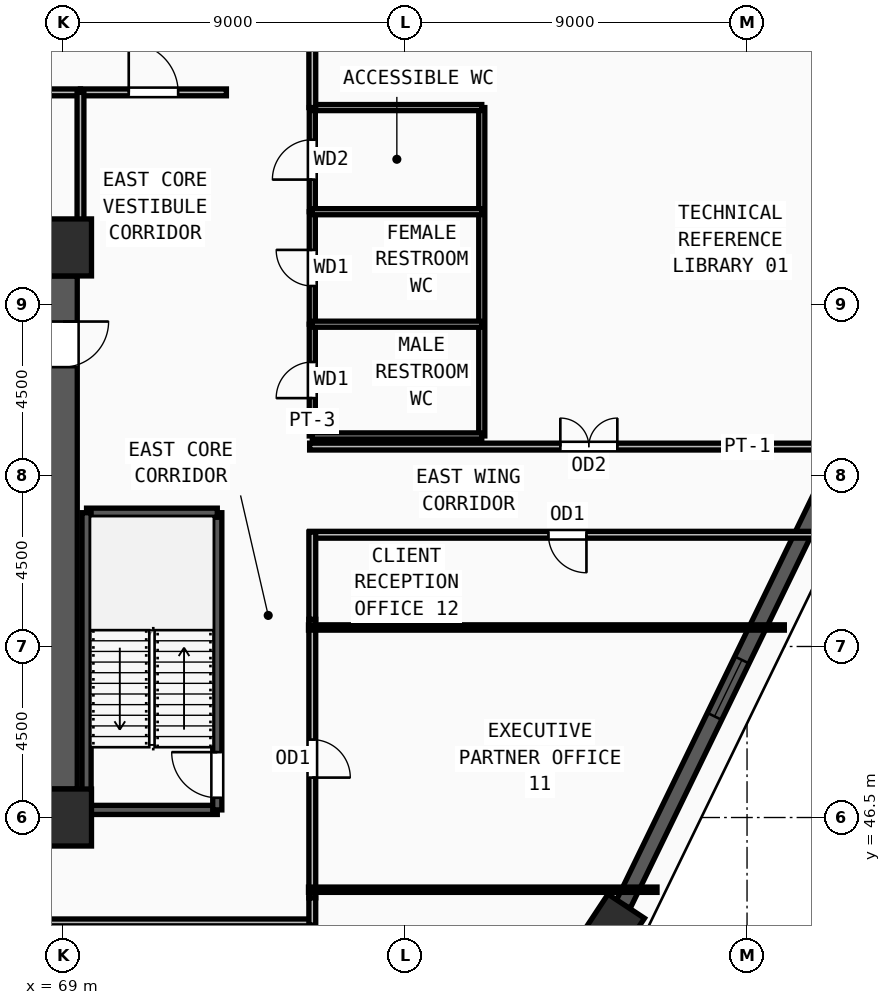
"""IFC4 building model, lengths in metres.
Left out: names, types, materials, properties, quantities, classifications, styles, units other than length and angle.
Written with IfcOpenShell. Run it as: python <this file> out.ifc"""

import sys

from ifc_helpers import new_model, si_unit, direction, frame, frame_2d, origin, origin_2d, place, context, subcontext, project, spatial, rectangle, extrude, source, transform, mapped, element, fill, save


model = new_model("IFC4")
c1 = context("Model", 3, precision=1e-05, world=origin(), true_north=direction((0.0, 1.0)))
c2 = subcontext(c1, "Body", "Model", "MODEL_VIEW")
j1 = project(units=[si_unit("LENGTHUNIT", "METRE"), si_unit("PLANEANGLEUNIT", "RADIAN")], contexts=[c1])
p1 = place(None, origin())
s1 = spatial("IfcSite", under=j1, at=p1, CompositionType="ELEMENT")
p2 = place(p1, origin())
s2 = spatial("IfcBuilding", under=s1, at=p2, CompositionType="ELEMENT")
p3 = place(p2, frame((0.0, 0.0, 155.25)))
s3 = spatial("IfcBuildingStorey", under=s2, at=p3, CompositionType="ELEMENT", Elevation=155.25)
m1 = source(origin(), c2, "Body", "SweptSolid", [
    extrude(rectangle(XDim=1.5, YDim=1.5, at=origin_2d()), origin(), (0.0, 0.0, 1.0), 3.75),
])
for number, where, z_axis, x_axis in (
    (1, (69.0, 46.5, 0.0), (0.0, 0.0, 1.0), (1.0, 0.0, 0.0)),
    (2, (69.0, 61.5, 0.0), (0.0, 0.0, 1.0), (1.0, 0.0, 0.0)),
):
    element("IfcColumn", number, at=place(p3, frame(where, z_axis=z_axis, x_axis=x_axis)), inside=s3, PredefinedType="COLUMN", context=c2, shape_type="MappedRepresentation", body=[
        mapped(m1, transform((0.0, 0.0, 0.0), x_axis=(1.0, 0.0, 0.0), y_axis=(0.0, 1.0, 0.0), z_axis=(0.0, 0.0, 1.0), scale=1.0)),
    ])
m2 = source(origin(), c2, "Body", "SweptSolid", [
    extrude(rectangle(XDim=1.4, YDim=1.15, at=origin_2d()), origin(), (0.0, 0.0, 1.0), 3.75),
])
p4 = place(p3, frame((83.436, 43.582, 0.0), z_axis=(0.0, 0.0, 1.0), x_axis=(0.550917789925, 0.834559517796, 0.0)))
e3 = element("IfcColumn", 3, at=p4, inside=s3, PredefinedType="COLUMN", context=c2, shape_type="MappedRepresentation", body=[
    mapped(m2, transform((0.0, 0.0, 0.0), x_axis=(1.0, 0.0, 0.0), y_axis=(0.0, 1.0, 0.0), z_axis=(0.0, 0.0, 1.0), scale=1.0)),
])
p5 = place(p3, frame((83.737, 44.203, 0.0), z_axis=(0.0, 0.0, 1.0), x_axis=(0.436800646479, 0.899558333426, 0.0)))
e4 = element("IfcWall", 4, at=p5, inside=s3, PredefinedType="SOLIDWALL", context=c2, shape_type="SweptSolid", body=[
    extrude(rectangle(XDim=25.348, YDim=0.42, at=frame_2d((12.674, 0.0))), origin(), (0.0, 0.0, 1.0), 3.57),
])
m3 = source(origin(), c2, "Body", "SweptSolid", [
    extrude(rectangle(XDim=1.65, YDim=1.95, at=frame_2d((0.825, 0.975))), frame((0.0, 0.22, 0.0), z_axis=(0.0, -1.0, 0.0), x_axis=(1.0, 0.0, 0.0)), (0.0, 0.0, 1.0), 0.44),
])
p6 = place(p5, frame((5.512, 0.0, 0.55)))
e5 = element("IfcOpeningElement", 5, at=p6, cuts=e4, PredefinedType="OPENING", context=c2, shape_type="MappedRepresentation", body=[
    mapped(m3, transform((0.0, 0.0, 0.0), x_axis=(1.0, 0.0, 0.0), y_axis=(0.0, 1.0, 0.0), z_axis=(0.0, 0.0, 1.0), scale=1.0)),
])
p7 = place(p5, frame((18.186, 0.0, 0.55)))
e6 = element("IfcOpeningElement", 6, at=p7, cuts=e4, PredefinedType="OPENING", context=c2, shape_type="MappedRepresentation", body=[
    mapped(m3, transform((0.0, 0.0, 0.0), x_axis=(1.0, 0.0, 0.0), y_axis=(0.0, 1.0, 0.0), z_axis=(0.0, 0.0, 1.0), scale=1.0)),
])
p8 = place(p3, frame((69.0, 60.75, 0.0), z_axis=(0.0, 0.0, 1.0), x_axis=(0.0, -1.0, 0.0)))
e7 = element("IfcWall", 7, at=p8, inside=s3, PredefinedType="SHEAR", context=c2, shape_type="SweptSolid", body=[
    extrude(rectangle(XDim=13.5, YDim=0.75, at=frame_2d((6.75, 0.0))), origin(), (0.0, 0.0, 1.0), 3.57),
])
m4 = source(origin(), c2, "Body", "SweptSolid", [
    extrude(rectangle(XDim=1.2, YDim=2.2, at=frame_2d((0.6, 1.1))), frame((0.0, 0.385, 0.0), z_axis=(0.0, -1.0, 0.0), x_axis=(1.0, 0.0, 0.0)), (0.0, 0.0, 1.0), 0.77),
])
p9 = place(p8, frame((1.2, 0.0, 0.0)))
e8 = element("IfcOpeningElement", 8, at=p9, cuts=e7, PredefinedType="OPENING", context=c2, shape_type="MappedRepresentation", body=[
    mapped(m4, transform((0.0, 0.0, 0.0), x_axis=(1.0, 0.0, 0.0), y_axis=(0.0, 1.0, 0.0), z_axis=(0.0, 0.0, 1.0), scale=1.0)),
])
p10 = place(p3, frame((69.62, 46.7, 0.0), z_axis=(0.0, 0.0, 1.0), x_axis=(1.0, 0.0, 0.0)))
e9 = element("IfcWall", 9, at=p10, inside=s3, PredefinedType="SOLIDWALL", context=c2, shape_type="SweptSolid", body=[
    extrude(rectangle(XDim=3.44, YDim=0.24, at=frame_2d((1.72, 0.0))), origin(), (0.0, 0.0, 1.0), 3.57),
])
p11 = place(p3, frame((73.06, 46.7, 0.0), z_axis=(0.0, 0.0, 1.0), x_axis=(0.0, 1.0, 0.0)))
e10 = element("IfcWall", 10, at=p11, inside=s3, PredefinedType="SOLIDWALL", context=c2, shape_type="SweptSolid", body=[
    extrude(rectangle(XDim=7.82, YDim=0.24, at=frame_2d((3.91, 0.0))), origin(), (0.0, 0.0, 1.0), 3.57),
])
m5 = source(origin(), c2, "Body", "SweptSolid", [
    extrude(rectangle(XDim=1.2, YDim=2.2, at=frame_2d((0.6, 1.1))), frame((0.0, 0.13, 0.0), z_axis=(0.0, -1.0, 0.0), x_axis=(1.0, 0.0, 0.0)), (0.0, 0.0, 1.0), 0.26),
])
p12 = place(p11, frame((0.32, 0.0, 0.0)))
e11 = element("IfcOpeningElement", 11, at=p12, cuts=e10, PredefinedType="OPENING", context=c2, shape_type="MappedRepresentation", body=[
    mapped(m5, transform((0.0, 0.0, 0.0), x_axis=(1.0, 0.0, 0.0), y_axis=(0.0, 1.0, 0.0), z_axis=(0.0, 0.0, 1.0), scale=1.0)),
])
p13 = place(p3, frame((73.06, 54.52, 0.0), z_axis=(0.0, 0.0, 1.0), x_axis=(-1.0, 0.0, 0.0)))
e12 = element("IfcWall", 12, at=p13, inside=s3, PredefinedType="SOLIDWALL", context=c2, shape_type="SweptSolid", body=[
    extrude(rectangle(XDim=3.44, YDim=0.24, at=frame_2d((1.72, 0.0))), origin(), (0.0, 0.0, 1.0), 3.57),
])
p14 = place(p3, frame((69.62, 54.52, 0.0), z_axis=(0.0, 0.0, 1.0), x_axis=(0.0, -1.0, 0.0)))
e13 = element("IfcWall", 13, at=p14, inside=s3, PredefinedType="SOLIDWALL", context=c2, shape_type="SweptSolid", body=[
    extrude(rectangle(XDim=7.82, YDim=0.24, at=frame_2d((3.91, 0.0))), origin(), (0.0, 0.0, 1.0), 3.57),
])
p15 = place(p3, frame((75.56, 56.54, 0.0), z_axis=(0.0, 0.0, 1.0), x_axis=(0.0, 1.0, 0.0)))
e14 = element("IfcWall", 14, at=p15, inside=s3, PredefinedType="PARTITIONING", context=c2, shape_type="SweptSolid", body=[
    extrude(rectangle(XDim=2.94, YDim=0.16, at=frame_2d((1.47, 0.0))), origin(), (0.0, 0.0, 1.0), 3.57),
])
m6 = source(origin(), c2, "Body", "SweptSolid", [
    extrude(rectangle(XDim=0.95, YDim=2.15, at=frame_2d((0.475, 1.075))), frame((0.0, 0.09, 0.0), z_axis=(0.0, -1.0, 0.0), x_axis=(1.0, 0.0, 0.0)), (0.0, 0.0, 1.0), 0.18),
])
p16 = place(p15, frame((0.995, 0.0, 0.0)))
e15 = element("IfcOpeningElement", 15, at=p16, cuts=e14, PredefinedType="OPENING", context=c2, shape_type="MappedRepresentation", body=[
    mapped(m6, transform((0.0, 0.0, 0.0), x_axis=(1.0, 0.0, 0.0), y_axis=(0.0, 1.0, 0.0), z_axis=(0.0, 0.0, 1.0), scale=1.0)),
])
p17 = place(p3, frame((75.56, 59.48, 0.0), z_axis=(0.0, 0.0, 1.0), x_axis=(0.0, 1.0, 0.0)))
e16 = element("IfcWall", 16, at=p17, inside=s3, PredefinedType="PARTITIONING", context=c2, shape_type="SweptSolid", body=[
    extrude(rectangle(XDim=2.96, YDim=0.16, at=frame_2d((1.48, 0.0))), origin(), (0.0, 0.0, 1.0), 3.57),
])
p18 = place(p17, frame((1.005, 0.0, 0.0)))
e17 = element("IfcOpeningElement", 17, at=p18, cuts=e16, PredefinedType="OPENING", context=c2, shape_type="MappedRepresentation", body=[
    mapped(m6, transform((0.0, 0.0, 0.0), x_axis=(1.0, 0.0, 0.0), y_axis=(0.0, 1.0, 0.0), z_axis=(0.0, 0.0, 1.0), scale=1.0)),
])
p19 = place(p3, frame((75.56, 62.44, 0.0), z_axis=(0.0, 0.0, 1.0), x_axis=(0.0, 1.0, 0.0)))
e18 = element("IfcWall", 18, at=p19, inside=s3, PredefinedType="PARTITIONING", context=c2, shape_type="SweptSolid", body=[
    extrude(rectangle(XDim=2.74, YDim=0.16, at=frame_2d((1.37, 0.0))), origin(), (0.0, 0.0, 1.0), 3.57),
])
m7 = source(origin(), c2, "Body", "SweptSolid", [
    extrude(rectangle(XDim=1.05, YDim=2.15, at=frame_2d((0.525, 1.075))), frame((0.0, 0.09, 0.0), z_axis=(0.0, -1.0, 0.0), x_axis=(1.0, 0.0, 0.0)), (0.0, 0.0, 1.0), 0.18),
])
p20 = place(p19, frame((0.845, 0.0, 0.0)))
e19 = element("IfcOpeningElement", 19, at=p20, cuts=e18, PredefinedType="OPENING", context=c2, shape_type="MappedRepresentation", body=[
    mapped(m7, transform((0.0, 0.0, 0.0), x_axis=(1.0, 0.0, 0.0), y_axis=(0.0, 1.0, 0.0), z_axis=(0.0, 0.0, 1.0), scale=1.0)),
])
p21 = place(p3, frame((62.39, 65.58, 0.0), z_axis=(0.0, 0.0, 1.0), x_axis=(1.0, 0.0, 0.0)))
e20 = element("IfcWall", 20, at=p21, inside=s3, PredefinedType="PARTITIONING", context=c2, shape_type="SweptSolid", body=[
    extrude(rectangle(XDim=7.07, YDim=0.18, at=frame_2d((3.535, 0.0))), origin(), (0.0, 0.0, 1.0), 3.57),
])
m8 = source(origin(), c2, "Body", "SweptSolid", [
    extrude(rectangle(XDim=1.0, YDim=2.2, at=frame_2d((0.5, 1.1))), frame((0.0, 0.1, 0.0), z_axis=(0.0, -1.0, 0.0), x_axis=(1.0, 0.0, 0.0)), (0.0, 0.0, 1.0), 0.2),
])
p22 = place(p21, frame((3.035, 0.0, 0.0)))
e21 = element("IfcOpeningElement", 21, at=p22, cuts=e20, PredefinedType="OPENING", context=c2, shape_type="MappedRepresentation", body=[
    mapped(m8, transform((0.0, 0.0, 0.0), x_axis=(1.0, 0.0, 0.0), y_axis=(0.0, 1.0, 0.0), z_axis=(0.0, 0.0, 1.0), scale=1.0)),
])
p23 = place(p3, frame((69.46, 65.58, 0.0), z_axis=(0.0, 0.0, 1.0), x_axis=(1.0, 0.0, 0.0)))
e22 = element("IfcWall", 22, at=p23, inside=s3, PredefinedType="PARTITIONING", context=c2, shape_type="SweptSolid", body=[
    extrude(rectangle(XDim=3.84, YDim=0.18, at=frame_2d((1.92, 0.0))), origin(), (0.0, 0.0, 1.0), 3.57),
])
m9 = source(origin(), c2, "Body", "SweptSolid", [
    extrude(rectangle(XDim=1.3, YDim=2.2, at=frame_2d((0.65, 1.1))), frame((0.0, 0.1, 0.0), z_axis=(0.0, -1.0, 0.0), x_axis=(1.0, 0.0, 0.0)), (0.0, 0.0, 1.0), 0.2),
])
p24 = place(p23, frame((1.27, 0.0, 0.0)))
e23 = element("IfcOpeningElement", 23, at=p24, cuts=e22, PredefinedType="OPENING", context=c2, shape_type="MappedRepresentation", body=[
    mapped(m9, transform((0.0, 0.0, 0.0), x_axis=(1.0, 0.0, 0.0), y_axis=(0.0, 1.0, 0.0), z_axis=(0.0, 0.0, 1.0), scale=1.0)),
])
p25 = place(p3, frame((75.49, 56.26, 0.0), z_axis=(0.0, 0.0, 1.0), x_axis=(1.0, 0.0, 0.0)))
e24 = element("IfcWall", 24, at=p25, inside=s3, PredefinedType="PARTITIONING", context=c2, shape_type="SweptSolid", body=[
    extrude(rectangle(XDim=14.694, YDim=0.18, at=frame_2d((7.347, 0.0))), origin(), (0.0, 0.0, 1.0), 3.57),
])
m10 = source(origin(), c2, "Body", "SweptSolid", [
    extrude(rectangle(XDim=1.5, YDim=2.2, at=frame_2d((0.75, 1.1))), frame((0.0, 0.1, 0.0), z_axis=(0.0, -1.0, 0.0), x_axis=(1.0, 0.0, 0.0)), (0.0, 0.0, 1.0), 0.2),
])
p26 = place(p25, frame((6.597, 0.0, 0.0)))
e25 = element("IfcOpeningElement", 25, at=p26, cuts=e24, PredefinedType="OPENING", context=c2, shape_type="MappedRepresentation", body=[
    mapped(m10, transform((0.0, 0.0, 0.0), x_axis=(1.0, 0.0, 0.0), y_axis=(0.0, 1.0, 0.0), z_axis=(0.0, 0.0, 1.0), scale=1.0)),
])
p27 = place(p3, frame((75.63, 43.74, 0.0), z_axis=(0.0, 0.0, 1.0), x_axis=(-1.0, 0.0, 0.0)))
e26 = element("IfcWall", 26, at=p27, inside=s3, PredefinedType="PARTITIONING", context=c2, shape_type="SweptSolid", body=[
    extrude(rectangle(XDim=31.26, YDim=0.18, at=frame_2d((15.63, 0.0))), origin(), (0.0, 0.0, 1.0), 3.57),
])
p28 = place(p27, frame((10.08, 0.0, 0.0)))
e27 = element("IfcOpeningElement", 27, at=p28, cuts=e26, PredefinedType="OPENING", context=c2, shape_type="MappedRepresentation", body=[
    mapped(m10, transform((0.0, 0.0, 0.0), x_axis=(1.0, 0.0, 0.0), y_axis=(0.0, 1.0, 0.0), z_axis=(0.0, 0.0, 1.0), scale=1.0)),
])
p29 = place(p3, frame((75.56, 51.715, 0.0), z_axis=(0.0, 0.0, 1.0), x_axis=(0.0, -1.0, 0.0)))
e28 = element("IfcWall", 28, at=p29, inside=s3, PredefinedType="PARTITIONING", context=c2, shape_type="SweptSolid", body=[
    extrude(rectangle(XDim=7.33, YDim=0.18, at=frame_2d((3.665, 0.0))), origin(), (0.0, 0.0, 1.0), 3.155),
])
p30 = place(p29, frame((3.165, 0.0, 0.0)))
e29 = element("IfcOpeningElement", 29, at=p30, cuts=e28, PredefinedType="OPENING", context=c2, shape_type="MappedRepresentation", body=[
    mapped(m8, transform((0.0, 0.0, 0.0), x_axis=(1.0, 0.0, 0.0), y_axis=(0.0, 1.0, 0.0), z_axis=(0.0, 0.0, 1.0), scale=1.0)),
])
p31 = place(p3, frame((89.058, 53.94, 0.0), z_axis=(0.0, 0.0, 1.0), x_axis=(-1.0, 0.0, 0.0)))
e30 = element("IfcWall", 30, at=p31, inside=s3, PredefinedType="PARTITIONING", context=c2, shape_type="SweptSolid", body=[
    extrude(rectangle(XDim=13.568, YDim=0.18, at=frame_2d((6.784, 0.0))), origin(), (0.0, 0.0, 1.0), 3.57),
])
p32 = place(p31, frame((6.284, 0.0, 0.0)))
e31 = element("IfcOpeningElement", 31, at=p32, cuts=e30, PredefinedType="OPENING", context=c2, shape_type="MappedRepresentation", body=[
    mapped(m8, transform((0.0, 0.0, 0.0), x_axis=(1.0, 0.0, 0.0), y_axis=(0.0, 1.0, 0.0), z_axis=(0.0, 0.0, 1.0), scale=1.0)),
])
p33 = place(p3, frame((80.02, 56.54, 0.0), z_axis=(0.0, 0.0, 1.0), x_axis=(0.0, 1.0, 0.0)))
e32 = element("IfcWall", 32, at=p33, inside=s3, PredefinedType="PARTITIONING", context=c2, shape_type="SweptSolid", body=[
    extrude(rectangle(XDim=8.64, YDim=0.16, at=frame_2d((4.32, 0.0))), origin(), (0.0, 0.0, 1.0), 3.57),
])
for number, where, z_axis, x_axis in (
    (33, (75.56, 56.54, 0.0), (0.0, 0.0, 1.0), (1.0, 0.0, 0.0)),
    (34, (75.56, 59.48, 0.0), (0.0, 0.0, 1.0), (1.0, 0.0, 0.0)),
    (35, (75.56, 62.44, 0.0), (0.0, 0.0, 1.0), (1.0, 0.0, 0.0)),
    (36, (75.56, 65.18, 0.0), (0.0, 0.0, 1.0), (1.0, 0.0, 0.0)),
):
    element("IfcWall", number, at=place(p3, frame(where, z_axis=z_axis, x_axis=x_axis)), inside=s3, PredefinedType="PARTITIONING", context=c2, shape_type="SweptSolid", body=[
        extrude(rectangle(XDim=4.46, YDim=0.16, at=frame_2d((2.23, 0.0))), origin(), (0.0, 0.0, 1.0), 3.57),
    ])
p34 = place(p3, frame((69.46, 61.95, 0.0), z_axis=(0.0, 0.0, 1.0), x_axis=(0.0, 1.0, 0.0)))
e37 = element("IfcWall", 37, at=p34, inside=s3, PredefinedType="PARTITIONING", context=c2, shape_type="SweptSolid", body=[
    extrude(rectangle(XDim=3.63, YDim=0.18, at=frame_2d((1.815, 0.0))), origin(), (0.0, 0.0, 1.0), 3.57),
])
p35 = place(p3, frame((75.56, 67.215, 0.0), z_axis=(0.0, 0.0, 1.0), x_axis=(0.0, -1.0, 0.0)))
e38 = element("IfcWall", 38, at=p35, inside=s3, PredefinedType="PARTITIONING", context=c2, shape_type="SweptSolid", body=[
    extrude(rectangle(XDim=2.035, YDim=0.18, at=frame_2d((1.018, 0.0))), origin(), (0.0, 0.0, 1.0), 3.57),
])
p36 = place(p3, frame((75.56, 44.385, 0.0), z_axis=(0.0, 0.0, 1.0), x_axis=(0.0, -1.0, 0.0)))
e39 = element("IfcWall", 39, at=p36, inside=s3, PredefinedType="PARTITIONING", context=c2, shape_type="SweptSolid", body=[
    extrude(rectangle(XDim=0.715, YDim=0.18, at=frame_2d((0.357, 0.0))), origin(), (0.0, 0.0, 1.0), 3.57),
])
p37 = place(p3, frame((75.56, 54.01, 0.0), z_axis=(0.0, 0.0, 1.0), x_axis=(0.0, -1.0, 0.0)))
e40 = element("IfcWall", 40, at=p37, inside=s3, PredefinedType="PARTITIONING", context=c2, shape_type="SweptSolid", body=[
    extrude(rectangle(XDim=2.295, YDim=0.18, at=frame_2d((1.147, 0.0))), origin(), (0.0, 0.0, 1.0), 3.57),
])
p38 = place(p3, frame((75.46, 44.6, 0.0), z_axis=(0.0, 0.0, 1.0), x_axis=(1.0, 0.0, 0.0)))
e41 = element("IfcWall", 41, at=p38, inside=s3, PredefinedType="PARTITIONING", context=c2, shape_type="SweptSolid", body=[
    extrude(rectangle(XDim=9.171, YDim=0.14, at=frame_2d((4.585, 0.0))), origin(), (0.0, 0.0, 1.0), 3.57),
])
p39 = place(p3, frame((75.46, 51.5, 0.0), z_axis=(0.0, 0.0, 1.0), x_axis=(1.0, 0.0, 0.0)))
e42 = element("IfcWall", 42, at=p39, inside=s3, PredefinedType="PARTITIONING", context=c2, shape_type="SweptSolid", body=[
    extrude(rectangle(XDim=12.521, YDim=0.14, at=frame_2d((6.26, 0.0))), origin(), (0.0, 0.0, 1.0), 3.57),
])
m11 = source(origin(), c2, "Body", "SweptSolid", [
    extrude(rectangle(XDim=1.65, YDim=1.95, at=frame_2d((0.825, 0.975))), frame((0.0, 0.03, 0.0), z_axis=(0.0, -1.0, 0.0), x_axis=(1.0, 0.0, 0.0)), (0.0, 0.0, 1.0), 0.06),
])
p40 = place(p6, origin())
e43 = element("IfcWindow", 43, at=p40, inside=s3, PartitioningType="DOUBLE_PANEL_VERTICAL", PredefinedType="WINDOW", context=c2, shape_type="MappedRepresentation", body=[
    mapped(m11, transform((0.0, 0.0, 0.0), x_axis=(1.0, 0.0, 0.0), y_axis=(0.0, 1.0, 0.0), z_axis=(0.0, 0.0, 1.0), scale=1.0)),
])
fill(e5, e43)
m12 = source(origin(), c2, "Body", "SweptSolid", [
    extrude(rectangle(XDim=1.2, YDim=2.2, at=frame_2d((0.6, 1.1))), frame((0.0, 0.025, 0.0), z_axis=(0.0, -1.0, 0.0), x_axis=(1.0, 0.0, 0.0)), (0.0, 0.0, 1.0), 0.05),
])
p41 = place(p9, origin())
e44 = element("IfcDoor", 44, at=p41, inside=s3, OperationType="SINGLE_SWING_LEFT", PredefinedType="DOOR", context=c2, shape_type="MappedRepresentation", body=[
    mapped(m12, transform((0.0, 0.0, 0.0), x_axis=(1.0, 0.0, 0.0), y_axis=(0.0, 1.0, 0.0), z_axis=(0.0, 0.0, 1.0), scale=1.0)),
])
fill(e8, e44)
p42 = place(p12, origin())
e45 = element("IfcDoor", 45, at=p42, inside=s3, OperationType="SINGLE_SWING_RIGHT", PredefinedType="DOOR", context=c2, shape_type="MappedRepresentation", body=[
    mapped(m12, transform((0.0, 0.0, 0.0), x_axis=(1.0, 0.0, 0.0), y_axis=(0.0, 1.0, 0.0), z_axis=(0.0, 0.0, 1.0), scale=1.0)),
])
fill(e11, e45)
m13 = source(origin(), c2, "Body", "SweptSolid", [
    extrude(rectangle(XDim=0.95, YDim=2.15, at=frame_2d((0.475, 1.075))), frame((0.0, 0.025, 0.0), z_axis=(0.0, -1.0, 0.0), x_axis=(1.0, 0.0, 0.0)), (0.0, 0.0, 1.0), 0.05),
])
p43 = place(p16, origin())
e46 = element("IfcDoor", 46, at=p43, inside=s3, OperationType="SINGLE_SWING_LEFT", PredefinedType="DOOR", context=c2, shape_type="MappedRepresentation", body=[
    mapped(m13, transform((0.0, 0.0, 0.0), x_axis=(1.0, 0.0, 0.0), y_axis=(0.0, 1.0, 0.0), z_axis=(0.0, 0.0, 1.0), scale=1.0)),
])
fill(e15, e46)
p44 = place(p18, origin())
e47 = element("IfcDoor", 47, at=p44, inside=s3, OperationType="SINGLE_SWING_RIGHT", PredefinedType="DOOR", context=c2, shape_type="MappedRepresentation", body=[
    mapped(m13, transform((0.0, 0.0, 0.0), x_axis=(1.0, 0.0, 0.0), y_axis=(0.0, 1.0, 0.0), z_axis=(0.0, 0.0, 1.0), scale=1.0)),
])
fill(e17, e47)
m14 = source(origin(), c2, "Body", "SweptSolid", [
    extrude(rectangle(XDim=1.05, YDim=2.15, at=frame_2d((0.525, 1.075))), frame((0.0, 0.025, 0.0), z_axis=(0.0, -1.0, 0.0), x_axis=(1.0, 0.0, 0.0)), (0.0, 0.0, 1.0), 0.05),
])
p45 = place(p20, origin())
e48 = element("IfcDoor", 48, at=p45, inside=s3, OperationType="SINGLE_SWING_LEFT", PredefinedType="DOOR", context=c2, shape_type="MappedRepresentation", body=[
    mapped(m14, transform((0.0, 0.0, 0.0), x_axis=(1.0, 0.0, 0.0), y_axis=(0.0, 1.0, 0.0), z_axis=(0.0, 0.0, 1.0), scale=1.0)),
])
fill(e19, e48)
m15 = source(origin(), c2, "Body", "SweptSolid", [
    extrude(rectangle(XDim=1.3, YDim=2.2, at=frame_2d((0.65, 1.1))), frame((0.0, 0.025, 0.0), z_axis=(0.0, -1.0, 0.0), x_axis=(1.0, 0.0, 0.0)), (0.0, 0.0, 1.0), 0.05),
])
p46 = place(p24, origin())
e49 = element("IfcDoor", 49, at=p46, inside=s3, OperationType="SINGLE_SWING_LEFT", PredefinedType="DOOR", context=c2, shape_type="MappedRepresentation", body=[
    mapped(m15, transform((0.0, 0.0, 0.0), x_axis=(1.0, 0.0, 0.0), y_axis=(0.0, 1.0, 0.0), z_axis=(0.0, 0.0, 1.0), scale=1.0)),
])
fill(e23, e49)
m16 = source(origin(), c2, "Body", "SweptSolid", [
    extrude(rectangle(XDim=1.5, YDim=2.2, at=frame_2d((0.75, 1.1))), frame((0.0, 0.025, 0.0), z_axis=(0.0, -1.0, 0.0), x_axis=(1.0, 0.0, 0.0)), (0.0, 0.0, 1.0), 0.05),
])
p47 = place(p26, origin())
e50 = element("IfcDoor", 50, at=p47, inside=s3, OperationType="DOUBLE_DOOR_SINGLE_SWING", PredefinedType="DOOR", context=c2, shape_type="MappedRepresentation", body=[
    mapped(m16, transform((0.0, 0.0, 0.0), x_axis=(1.0, 0.0, 0.0), y_axis=(0.0, 1.0, 0.0), z_axis=(0.0, 0.0, 1.0), scale=1.0)),
])
fill(e25, e50)
m17 = source(origin(), c2, "Body", "SweptSolid", [
    extrude(rectangle(XDim=1.0, YDim=2.2, at=frame_2d((0.5, 1.1))), frame((0.0, 0.025, 0.0), z_axis=(0.0, -1.0, 0.0), x_axis=(1.0, 0.0, 0.0)), (0.0, 0.0, 1.0), 0.05),
])
p48 = place(p30, origin())
e51 = element("IfcDoor", 51, at=p48, inside=s3, OperationType="SINGLE_SWING_RIGHT", PredefinedType="DOOR", context=c2, shape_type="MappedRepresentation", body=[
    mapped(m17, transform((0.0, 0.0, 0.0), x_axis=(1.0, 0.0, 0.0), y_axis=(0.0, 1.0, 0.0), z_axis=(0.0, 0.0, 1.0), scale=1.0)),
])
fill(e29, e51)
p49 = place(p32, origin())
e52 = element("IfcDoor", 52, at=p49, inside=s3, OperationType="SINGLE_SWING_LEFT", PredefinedType="DOOR", context=c2, shape_type="MappedRepresentation", body=[
    mapped(m17, transform((0.0, 0.0, 0.0), x_axis=(1.0, 0.0, 0.0), y_axis=(0.0, 1.0, 0.0), z_axis=(0.0, 0.0, 1.0), scale=1.0)),
])
fill(e31, e52)
save(model, sys.argv[1])
